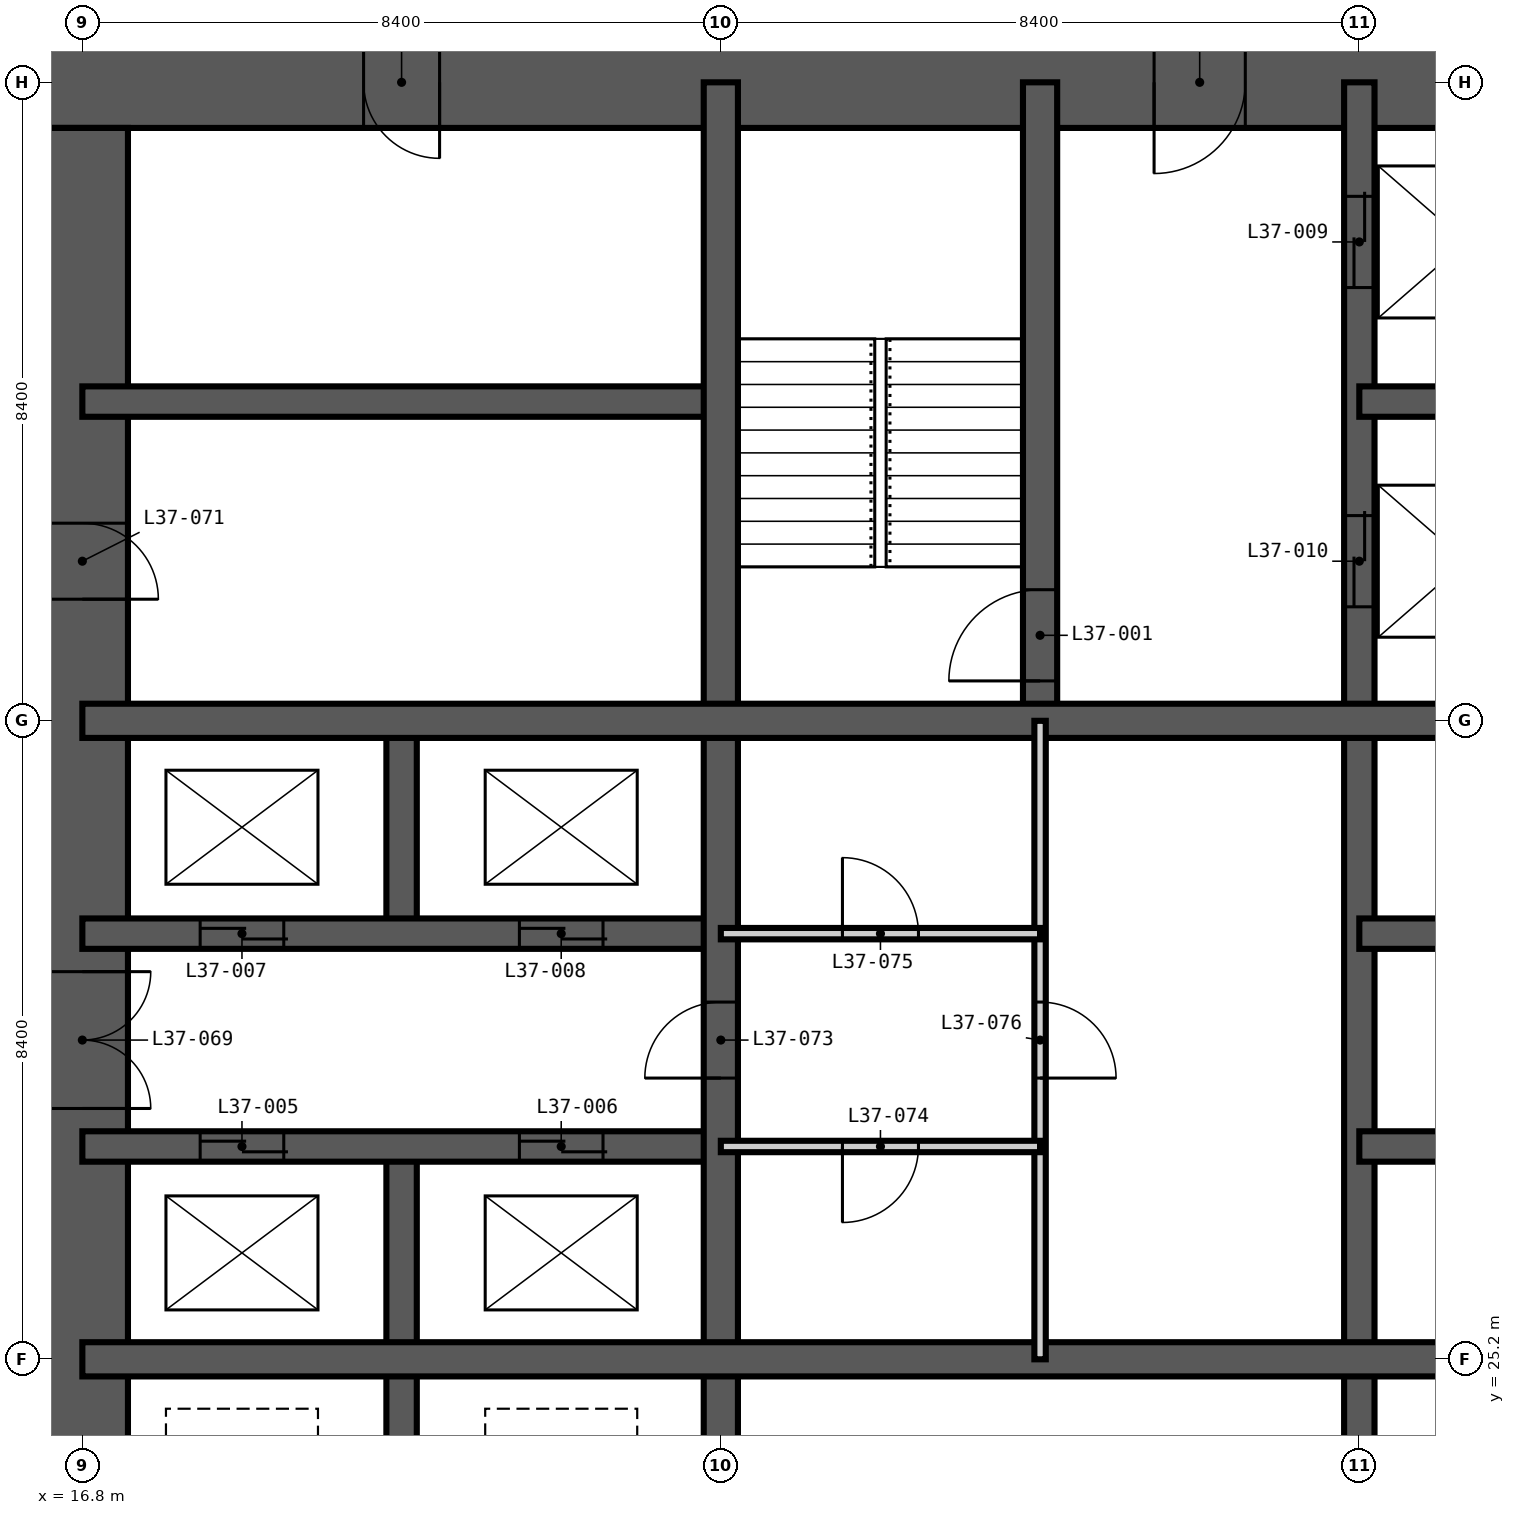
"""IFC4 building model, lengths in metres.
Left out: names, types, materials, properties, quantities, classifications, styles, units other than length and angle.
Written with IfcOpenShell. Run it as: python <this file> out.ifc"""

import sys

from ifc_helpers import new_model, si_unit, direction, frame, frame_2d, origin, place, context, subcontext, project, spatial, rectangle, extrude, element, fill, save


model = new_model("IFC4")
c1 = context("Model", 3, precision=1e-05, world=origin(), true_north=direction((0.0, 1.0)))
c2 = subcontext(c1, "Body", "Model", "MODEL_VIEW")
j1 = project(units=[si_unit("LENGTHUNIT", "METRE"), si_unit("PLANEANGLEUNIT", "RADIAN")], contexts=[c1])
p1 = place(None, origin())
s1 = spatial("IfcSite", under=j1, at=p1, CompositionType="ELEMENT")
p2 = place(p1, origin())
s2 = spatial("IfcBuilding", under=s1, at=p2, CompositionType="ELEMENT")
p3 = place(p2, frame((0.0, 0.0, 144.0)))
s3 = spatial("IfcBuildingStorey", under=s2, at=p3, CompositionType="ELEMENT", Elevation=144.0)
p4 = place(p3, frame((42.6, 42.0, -0.35), z_axis=(0.0, 0.0, 1.0), x_axis=(-1.0, 0.0, 0.0)))
e1 = element("IfcWall", 1, at=p4, inside=s3, PredefinedType="SHEAR", context=c2, shape_type="SweptSolid", body=[
    extrude(rectangle(XDim=26.4, YDim=1.2, at=frame_2d((13.2, 0.0))), origin(), (0.0, 0.0, 1.0), 3.6),
])
p5 = place(p4, frame((21.1, 0.0, 0.35)))
e2 = element("IfcOpeningElement", 2, at=p5, cuts=e1, PredefinedType="OPENING", context=c2, shape_type="SweptSolid", body=[
    extrude(rectangle(XDim=1.0, YDim=2.1, at=frame_2d((0.5, 1.05))), frame((0.0, 0.61, 0.0), z_axis=(0.0, -1.0, 0.0), x_axis=(1.0, 0.0, 0.0)), (0.0, 0.0, 1.0), 1.22),
])
p6 = place(p4, frame((10.5, 0.0, 0.35)))
e3 = element("IfcOpeningElement", 3, at=p6, cuts=e1, PredefinedType="OPENING", context=c2, shape_type="SweptSolid", body=[
    extrude(rectangle(XDim=1.2, YDim=2.2, at=frame_2d((0.6, 1.1))), frame((0.0, 0.61, 0.0), z_axis=(0.0, -1.0, 0.0), x_axis=(1.0, 0.0, 0.0)), (0.0, 0.0, 1.0), 1.22),
])
p7 = place(p3, frame((16.8, 41.4, -0.35), z_axis=(0.0, 0.0, 1.0), x_axis=(0.0, -1.0, 0.0)))
e4 = element("IfcWall", 4, at=p7, inside=s3, PredefinedType="SHEAR", context=c2, shape_type="SweptSolid", body=[
    extrude(rectangle(XDim=24.0, YDim=1.2, at=frame_2d((12.0, 0.0))), origin(), (0.0, 0.0, 1.0), 3.6),
])
p8 = place(p7, frame((11.1, 0.0, 0.35)))
e5 = element("IfcOpeningElement", 5, at=p8, cuts=e4, PredefinedType="OPENING", context=c2, shape_type="SweptSolid", body=[
    extrude(rectangle(XDim=1.8, YDim=2.2, at=frame_2d((0.9, 1.1))), frame((0.0, 0.61, 0.0), z_axis=(0.0, -1.0, 0.0), x_axis=(1.0, 0.0, 0.0)), (0.0, 0.0, 1.0), 1.22),
])
p9 = place(p7, frame((19.9, 0.0, 0.35)))
e6 = element("IfcOpeningElement", 6, at=p9, cuts=e4, PredefinedType="OPENING", context=c2, shape_type="SweptSolid", body=[
    extrude(rectangle(XDim=1.0, YDim=2.1, at=frame_2d((0.5, 1.05))), frame((0.0, 0.61, 0.0), z_axis=(0.0, -1.0, 0.0), x_axis=(1.0, 0.0, 0.0)), (0.0, 0.0, 1.0), 1.22),
])
p10 = place(p7, frame((5.2, 0.0, 0.35)))
e7 = element("IfcOpeningElement", 7, at=p10, cuts=e4, PredefinedType="OPENING", context=c2, shape_type="SweptSolid", body=[
    extrude(rectangle(XDim=1.0, YDim=2.1, at=frame_2d((0.5, 1.05))), frame((0.0, 0.61, 0.0), z_axis=(0.0, -1.0, 0.0), x_axis=(1.0, 0.0, 0.0)), (0.0, 0.0, 1.0), 1.22),
])
p11 = place(p3, frame((21.0, 22.4, -0.35), z_axis=(0.0, 0.0, 1.0), x_axis=(0.0, 1.0, 0.0)))
e8 = element("IfcWall", 8, at=p11, inside=s3, PredefinedType="SHEAR", context=c2, shape_type="SweptSolid", body=[
    extrude(rectangle(XDim=5.6, YDim=0.4, at=frame_2d((2.8, 0.0))), origin(), (0.0, 0.0, 1.0), 3.6),
])
p12 = place(p3, frame((21.0, 30.8, -0.35), z_axis=(0.0, 0.0, 1.0), x_axis=(0.0, 1.0, 0.0)))
e9 = element("IfcWall", 9, at=p12, inside=s3, PredefinedType="SHEAR", context=c2, shape_type="SweptSolid", body=[
    extrude(rectangle(XDim=2.8, YDim=0.4, at=frame_2d((1.4, 0.0))), origin(), (0.0, 0.0, 1.0), 3.6),
])
p13 = place(p3, frame((33.6, 16.8, -0.35), z_axis=(0.0, 0.0, 1.0), x_axis=(0.0, 1.0, 0.0)))
e10 = element("IfcWall", 10, at=p13, inside=s3, PredefinedType="SHEAR", context=c2, shape_type="SweptSolid", body=[
    extrude(rectangle(XDim=25.2, YDim=0.4, at=frame_2d((12.6, 0.0))), origin(), (0.0, 0.0, 1.0), 3.6),
])
p14 = place(p13, frame((22.5, 0.0, 0.35)))
e11 = element("IfcOpeningElement", 11, at=p14, cuts=e10, PredefinedType="OPENING", context=c2, shape_type="SweptSolid", body=[
    extrude(rectangle(XDim=1.2, YDim=2.2, at=frame_2d((0.6, 1.1))), frame((0.0, 0.21, 0.0), z_axis=(0.0, -1.0, 0.0), x_axis=(1.0, 0.0, 0.0)), (0.0, 0.0, 1.0), 0.42),
])
p15 = place(p13, frame((18.3, 0.0, 0.35)))
e12 = element("IfcOpeningElement", 12, at=p15, cuts=e10, PredefinedType="OPENING", context=c2, shape_type="SweptSolid", body=[
    extrude(rectangle(XDim=1.2, YDim=2.2, at=frame_2d((0.6, 1.1))), frame((0.0, 0.21, 0.0), z_axis=(0.0, -1.0, 0.0), x_axis=(1.0, 0.0, 0.0)), (0.0, 0.0, 1.0), 0.42),
])
p16 = place(p3, frame((16.8, 28.0, -0.35), z_axis=(0.0, 0.0, 1.0), x_axis=(1.0, 0.0, 0.0)))
e13 = element("IfcWall", 13, at=p16, inside=s3, PredefinedType="SHEAR", context=c2, shape_type="SweptSolid", body=[
    extrude(rectangle(XDim=8.4, YDim=0.4, at=frame_2d((4.2, 0.0))), origin(), (0.0, 0.0, 1.0), 3.6),
])
p17 = place(p16, frame((1.55, 0.0, 0.35)))
e14 = element("IfcOpeningElement", 14, at=p17, cuts=e13, PredefinedType="OPENING", context=c2, shape_type="SweptSolid", body=[
    extrude(rectangle(XDim=1.1, YDim=2.2, at=frame_2d((0.55, 1.1))), frame((0.0, 0.21, 0.0), z_axis=(0.0, -1.0, 0.0), x_axis=(1.0, 0.0, 0.0)), (0.0, 0.0, 1.0), 0.42),
])
p18 = place(p16, frame((5.75, 0.0, 0.35)))
e15 = element("IfcOpeningElement", 15, at=p18, cuts=e13, PredefinedType="OPENING", context=c2, shape_type="SweptSolid", body=[
    extrude(rectangle(XDim=1.1, YDim=2.2, at=frame_2d((0.55, 1.1))), frame((0.0, 0.21, 0.0), z_axis=(0.0, -1.0, 0.0), x_axis=(1.0, 0.0, 0.0)), (0.0, 0.0, 1.0), 0.42),
])
p19 = place(p3, frame((33.6, 28.0, -0.35), z_axis=(0.0, 0.0, 1.0), x_axis=(1.0, 0.0, 0.0)))
e16 = element("IfcWall", 16, at=p19, inside=s3, PredefinedType="SHEAR", context=c2, shape_type="SweptSolid", body=[
    extrude(rectangle(XDim=8.4, YDim=0.4, at=frame_2d((4.2, 0.0))), origin(), (0.0, 0.0, 1.0), 3.6),
])
p20 = place(p19, frame((1.55, 0.0, 0.35)))
e17 = element("IfcOpeningElement", 17, at=p20, cuts=e16, PredefinedType="OPENING", context=c2, shape_type="SweptSolid", body=[
    extrude(rectangle(XDim=1.1, YDim=2.2, at=frame_2d((0.55, 1.1))), frame((0.0, 0.21, 0.0), z_axis=(0.0, -1.0, 0.0), x_axis=(1.0, 0.0, 0.0)), (0.0, 0.0, 1.0), 0.42),
])
p21 = place(p19, frame((5.75, 0.0, 0.35)))
e18 = element("IfcOpeningElement", 18, at=p21, cuts=e16, PredefinedType="OPENING", context=c2, shape_type="SweptSolid", body=[
    extrude(rectangle(XDim=1.1, YDim=2.2, at=frame_2d((0.55, 1.1))), frame((0.0, 0.21, 0.0), z_axis=(0.0, -1.0, 0.0), x_axis=(1.0, 0.0, 0.0)), (0.0, 0.0, 1.0), 0.42),
])
p22 = place(p3, frame((16.8, 30.8, -0.35), z_axis=(0.0, 0.0, 1.0), x_axis=(1.0, 0.0, 0.0)))
e19 = element("IfcWall", 19, at=p22, inside=s3, PredefinedType="SHEAR", context=c2, shape_type="SweptSolid", body=[
    extrude(rectangle(XDim=8.4, YDim=0.4, at=frame_2d((4.2, 0.0))), origin(), (0.0, 0.0, 1.0), 3.6),
])
p23 = place(p22, frame((1.55, 0.0, 0.35)))
e20 = element("IfcOpeningElement", 20, at=p23, cuts=e19, PredefinedType="OPENING", context=c2, shape_type="SweptSolid", body=[
    extrude(rectangle(XDim=1.1, YDim=2.2, at=frame_2d((0.55, 1.1))), frame((0.0, 0.21, 0.0), z_axis=(0.0, -1.0, 0.0), x_axis=(1.0, 0.0, 0.0)), (0.0, 0.0, 1.0), 0.42),
])
p24 = place(p22, frame((5.75, 0.0, 0.35)))
e21 = element("IfcOpeningElement", 21, at=p24, cuts=e19, PredefinedType="OPENING", context=c2, shape_type="SweptSolid", body=[
    extrude(rectangle(XDim=1.1, YDim=2.2, at=frame_2d((0.55, 1.1))), frame((0.0, 0.21, 0.0), z_axis=(0.0, -1.0, 0.0), x_axis=(1.0, 0.0, 0.0)), (0.0, 0.0, 1.0), 0.42),
])
for number, where, z_axis, x_axis in (
    (22, (33.6, 30.8, -0.35), (0.0, 0.0, 1.0), (1.0, 0.0, 0.0)),
    (23, (16.8, 37.8, -0.35), (0.0, 0.0, 1.0), (1.0, 0.0, 0.0)),
):
    element("IfcWall", number, at=place(p3, frame(where, z_axis=z_axis, x_axis=x_axis)), inside=s3, PredefinedType="SHEAR", context=c2, shape_type="SweptSolid", body=[
        extrude(rectangle(XDim=8.4, YDim=0.4, at=frame_2d((4.2, 0.0))), origin(), (0.0, 0.0, 1.0), 3.6),
    ])
p25 = place(p3, frame((33.6, 37.8, -0.35), z_axis=(0.0, 0.0, 1.0), x_axis=(1.0, 0.0, 0.0)))
e24 = element("IfcWall", 24, at=p25, inside=s3, PredefinedType="SHEAR", context=c2, shape_type="SweptSolid", body=[
    extrude(rectangle(XDim=2.8, YDim=0.4, at=frame_2d((1.4, 0.0))), origin(), (0.0, 0.0, 1.0), 3.6),
])
p26 = place(p3, frame((25.2, 16.8, -0.35), z_axis=(0.0, 0.0, 1.0), x_axis=(0.0, 1.0, 0.0)))
e25 = element("IfcWall", 25, at=p26, inside=s3, PredefinedType="SHEAR", context=c2, shape_type="SweptSolid", body=[
    extrude(rectangle(XDim=25.2, YDim=0.45, at=frame_2d((12.6, 0.0))), origin(), (0.0, 0.0, 1.0), 3.6),
])
p27 = place(p26, frame((12.1, 0.0, 0.35)))
e26 = element("IfcOpeningElement", 26, at=p27, cuts=e25, PredefinedType="OPENING", context=c2, shape_type="SweptSolid", body=[
    extrude(rectangle(XDim=1.0, YDim=2.1, at=frame_2d((0.5, 1.05))), frame((0.0, 0.235, 0.0), z_axis=(0.0, -1.0, 0.0), x_axis=(1.0, 0.0, 0.0)), (0.0, 0.0, 1.0), 0.47),
])
p28 = place(p3, frame((29.4, 33.6, -0.35), z_axis=(0.0, 0.0, 1.0), x_axis=(0.0, 1.0, 0.0)))
e27 = element("IfcWall", 27, at=p28, inside=s3, PredefinedType="SHEAR", context=c2, shape_type="SweptSolid", body=[
    extrude(rectangle(XDim=8.4, YDim=0.45, at=frame_2d((4.2, 0.0))), origin(), (0.0, 0.0, 1.0), 3.6),
])
p29 = place(p28, frame((0.525, 0.0, 0.35)))
e28 = element("IfcOpeningElement", 28, at=p29, cuts=e27, PredefinedType="OPENING", context=c2, shape_type="SweptSolid", body=[
    extrude(rectangle(XDim=1.2, YDim=2.2, at=frame_2d((0.6, 1.1))), frame((0.0, 0.235, 0.0), z_axis=(0.0, -1.0, 0.0), x_axis=(1.0, 0.0, 0.0)), (0.0, 0.0, 1.0), 0.47),
])
for number, where, z_axis, x_axis in (
    (29, (16.8, 25.2, -0.35), (0.0, 0.0, 1.0), (1.0, 0.0, 0.0)),
    (30, (16.8, 33.6, -0.35), (0.0, 0.0, 1.0), (1.0, 0.0, 0.0)),
):
    element("IfcWall", number, at=place(p3, frame(where, z_axis=z_axis, x_axis=x_axis)), inside=s3, PredefinedType="SHEAR", context=c2, shape_type="SweptSolid", body=[
        extrude(rectangle(XDim=25.2, YDim=0.45, at=frame_2d((12.6, 0.0))), origin(), (0.0, 0.0, 1.0), 3.6),
    ])
p30 = place(p3, frame((29.4, 25.2, 0.0), z_axis=(0.0, 0.0, 1.0), x_axis=(0.0, 1.0, 0.0)))
e31 = element("IfcWall", 31, at=p30, inside=s3, PredefinedType="PARTITIONING", context=c2, shape_type="SweptSolid", body=[
    extrude(rectangle(XDim=8.4, YDim=0.15, at=frame_2d((4.2, 0.0))), origin(), (0.0, 0.0, 1.0), 3.25),
])
p31 = place(p30, frame((3.7, 0.0, 0.0)))
e32 = element("IfcOpeningElement", 32, at=p31, cuts=e31, PredefinedType="OPENING", context=c2, shape_type="SweptSolid", body=[
    extrude(rectangle(XDim=1.0, YDim=2.1, at=frame_2d((0.5, 1.05))), frame((0.0, 0.085, 0.0), z_axis=(0.0, -1.0, 0.0), x_axis=(1.0, 0.0, 0.0)), (0.0, 0.0, 1.0), 0.17),
])
p32 = place(p3, frame((25.2, 28.0, 0.0), z_axis=(0.0, 0.0, 1.0), x_axis=(1.0, 0.0, 0.0)))
e33 = element("IfcWall", 33, at=p32, inside=s3, PredefinedType="PARTITIONING", context=c2, shape_type="SweptSolid", body=[
    extrude(rectangle(XDim=4.2, YDim=0.15, at=frame_2d((2.1, 0.0))), origin(), (0.0, 0.0, 1.0), 3.25),
])
p33 = place(p32, frame((1.6, 0.0, 0.0)))
e34 = element("IfcOpeningElement", 34, at=p33, cuts=e33, PredefinedType="OPENING", context=c2, shape_type="SweptSolid", body=[
    extrude(rectangle(XDim=1.0, YDim=2.1, at=frame_2d((0.5, 1.05))), frame((0.0, 0.085, 0.0), z_axis=(0.0, -1.0, 0.0), x_axis=(1.0, 0.0, 0.0)), (0.0, 0.0, 1.0), 0.17),
])
p34 = place(p3, frame((25.2, 30.8, 0.0), z_axis=(0.0, 0.0, 1.0), x_axis=(1.0, 0.0, 0.0)))
e35 = element("IfcWall", 35, at=p34, inside=s3, PredefinedType="PARTITIONING", context=c2, shape_type="SweptSolid", body=[
    extrude(rectangle(XDim=4.2, YDim=0.15, at=frame_2d((2.1, 0.0))), origin(), (0.0, 0.0, 1.0), 3.25),
])
p35 = place(p34, frame((1.6, 0.0, 0.0)))
e36 = element("IfcOpeningElement", 36, at=p35, cuts=e35, PredefinedType="OPENING", context=c2, shape_type="SweptSolid", body=[
    extrude(rectangle(XDim=1.0, YDim=2.1, at=frame_2d((0.5, 1.05))), frame((0.0, 0.085, 0.0), z_axis=(0.0, -1.0, 0.0), x_axis=(1.0, 0.0, 0.0)), (0.0, 0.0, 1.0), 0.17),
])
p36 = place(p29, origin())
e37 = element("IfcDoor", 37, at=p36, inside=s3, OperationType="SINGLE_SWING_LEFT", PredefinedType="DOOR", context=c2, shape_type="SweptSolid", body=[
    extrude(rectangle(XDim=1.2, YDim=2.2, at=frame_2d((0.6, 1.1))), frame((0.0, 0.025, 0.0), z_axis=(0.0, -1.0, 0.0), x_axis=(1.0, 0.0, 0.0)), (0.0, 0.0, 1.0), 0.05),
])
fill(e28, e37)
p37 = place(p17, origin())
e38 = element("IfcDoor", 38, at=p37, inside=s3, OperationType="DOUBLE_DOOR_SLIDING", PredefinedType="DOOR", context=c2, shape_type="SweptSolid", body=[
    extrude(rectangle(XDim=1.1, YDim=2.2, at=frame_2d((0.55, 1.1))), frame((0.0, 0.025, 0.0), z_axis=(0.0, -1.0, 0.0), x_axis=(1.0, 0.0, 0.0)), (0.0, 0.0, 1.0), 0.05),
])
fill(e14, e38)
p38 = place(p18, origin())
e39 = element("IfcDoor", 39, at=p38, inside=s3, OperationType="DOUBLE_DOOR_SLIDING", PredefinedType="DOOR", context=c2, shape_type="SweptSolid", body=[
    extrude(rectangle(XDim=1.1, YDim=2.2, at=frame_2d((0.55, 1.1))), frame((0.0, 0.025, 0.0), z_axis=(0.0, -1.0, 0.0), x_axis=(1.0, 0.0, 0.0)), (0.0, 0.0, 1.0), 0.05),
])
fill(e15, e39)
p39 = place(p23, origin())
e40 = element("IfcDoor", 40, at=p39, inside=s3, OperationType="DOUBLE_DOOR_SLIDING", PredefinedType="DOOR", context=c2, shape_type="SweptSolid", body=[
    extrude(rectangle(XDim=1.1, YDim=2.2, at=frame_2d((0.55, 1.1))), frame((0.0, 0.025, 0.0), z_axis=(0.0, -1.0, 0.0), x_axis=(1.0, 0.0, 0.0)), (0.0, 0.0, 1.0), 0.05),
])
fill(e20, e40)
p40 = place(p24, origin())
e41 = element("IfcDoor", 41, at=p40, inside=s3, OperationType="DOUBLE_DOOR_SLIDING", PredefinedType="DOOR", context=c2, shape_type="SweptSolid", body=[
    extrude(rectangle(XDim=1.1, YDim=2.2, at=frame_2d((0.55, 1.1))), frame((0.0, 0.025, 0.0), z_axis=(0.0, -1.0, 0.0), x_axis=(1.0, 0.0, 0.0)), (0.0, 0.0, 1.0), 0.05),
])
fill(e21, e41)
p41 = place(p14, origin())
e42 = element("IfcDoor", 42, at=p41, inside=s3, OperationType="DOUBLE_DOOR_SLIDING", PredefinedType="DOOR", context=c2, shape_type="SweptSolid", body=[
    extrude(rectangle(XDim=1.2, YDim=2.2, at=frame_2d((0.6, 1.1))), frame((0.0, 0.025, 0.0), z_axis=(0.0, -1.0, 0.0), x_axis=(1.0, 0.0, 0.0)), (0.0, 0.0, 1.0), 0.05),
])
fill(e11, e42)
p42 = place(p15, origin())
e43 = element("IfcDoor", 43, at=p42, inside=s3, OperationType="DOUBLE_DOOR_SLIDING", PredefinedType="DOOR", context=c2, shape_type="SweptSolid", body=[
    extrude(rectangle(XDim=1.2, YDim=2.2, at=frame_2d((0.6, 1.1))), frame((0.0, 0.025, 0.0), z_axis=(0.0, -1.0, 0.0), x_axis=(1.0, 0.0, 0.0)), (0.0, 0.0, 1.0), 0.05),
])
fill(e12, e43)
p43 = place(p8, origin())
e44 = element("IfcDoor", 44, at=p43, inside=s3, OperationType="DOUBLE_DOOR_DOUBLE_SWING", PredefinedType="DOOR", context=c2, shape_type="SweptSolid", body=[
    extrude(rectangle(XDim=1.8, YDim=2.2, at=frame_2d((0.9, 1.1))), frame((0.0, 0.025, 0.0), z_axis=(0.0, -1.0, 0.0), x_axis=(1.0, 0.0, 0.0)), (0.0, 0.0, 1.0), 0.05),
])
fill(e5, e44)
p44 = place(p10, origin())
e45 = element("IfcDoor", 45, at=p44, inside=s3, OperationType="SINGLE_SWING_RIGHT", PredefinedType="DOOR", context=c2, shape_type="SweptSolid", body=[
    extrude(rectangle(XDim=1.0, YDim=2.1, at=frame_2d((0.5, 1.05))), frame((0.0, 0.025, 0.0), z_axis=(0.0, -1.0, 0.0), x_axis=(1.0, 0.0, 0.0)), (0.0, 0.0, 1.0), 0.05),
])
fill(e7, e45)
p45 = place(p5, origin())
e46 = element("IfcDoor", 46, at=p45, inside=s3, OperationType="SINGLE_SWING_LEFT", PredefinedType="DOOR", context=c2, shape_type="SweptSolid", body=[
    extrude(rectangle(XDim=1.0, YDim=2.1, at=frame_2d((0.5, 1.05))), frame((0.0, 0.025, 0.0), z_axis=(0.0, -1.0, 0.0), x_axis=(1.0, 0.0, 0.0)), (0.0, 0.0, 1.0), 0.05),
])
fill(e2, e46)
p46 = place(p27, origin())
e47 = element("IfcDoor", 47, at=p46, inside=s3, OperationType="SINGLE_SWING_LEFT", PredefinedType="DOOR", context=c2, shape_type="SweptSolid", body=[
    extrude(rectangle(XDim=1.0, YDim=2.1, at=frame_2d((0.5, 1.05))), frame((0.0, 0.025, 0.0), z_axis=(0.0, -1.0, 0.0), x_axis=(1.0, 0.0, 0.0)), (0.0, 0.0, 1.0), 0.05),
])
fill(e26, e47)
p47 = place(p33, frame((1.0, 0.0, 0.0), z_axis=(0.0, 0.0, 1.0), x_axis=(-1.0, 0.0, 0.0)))
e48 = element("IfcDoor", 48, at=p47, inside=s3, OperationType="SINGLE_SWING_RIGHT", PredefinedType="DOOR", context=c2, shape_type="SweptSolid", body=[
    extrude(rectangle(XDim=1.0, YDim=2.1, at=frame_2d((0.5, 1.05))), frame((0.0, 0.025, 0.0), z_axis=(0.0, -1.0, 0.0), x_axis=(1.0, 0.0, 0.0)), (0.0, 0.0, 1.0), 0.05),
])
fill(e34, e48)
p48 = place(p35, origin())
e49 = element("IfcDoor", 49, at=p48, inside=s3, OperationType="SINGLE_SWING_LEFT", PredefinedType="DOOR", context=c2, shape_type="SweptSolid", body=[
    extrude(rectangle(XDim=1.0, YDim=2.1, at=frame_2d((0.5, 1.05))), frame((0.0, 0.025, 0.0), z_axis=(0.0, -1.0, 0.0), x_axis=(1.0, 0.0, 0.0)), (0.0, 0.0, 1.0), 0.05),
])
fill(e36, e49)
p49 = place(p31, frame((1.0, 0.0, 0.0), z_axis=(0.0, 0.0, 1.0), x_axis=(-1.0, 0.0, 0.0)))
e50 = element("IfcDoor", 50, at=p49, inside=s3, OperationType="SINGLE_SWING_RIGHT", PredefinedType="DOOR", context=c2, shape_type="SweptSolid", body=[
    extrude(rectangle(XDim=1.0, YDim=2.1, at=frame_2d((0.5, 1.05))), frame((0.0, 0.025, 0.0), z_axis=(0.0, -1.0, 0.0), x_axis=(1.0, 0.0, 0.0)), (0.0, 0.0, 1.0), 0.05),
])
fill(e32, e50)
p50 = place(p6, origin())
e51 = element("IfcDoor", 51, at=p50, inside=s3, OperationType="SINGLE_SWING_RIGHT", PredefinedType="DOOR", context=c2, shape_type="SweptSolid", body=[
    extrude(rectangle(XDim=1.2, YDim=2.2, at=frame_2d((0.6, 1.1))), frame((0.0, 0.025, 0.0), z_axis=(0.0, -1.0, 0.0), x_axis=(1.0, 0.0, 0.0)), (0.0, 0.0, 1.0), 0.05),
])
fill(e3, e51)
save(model, sys.argv[1])
